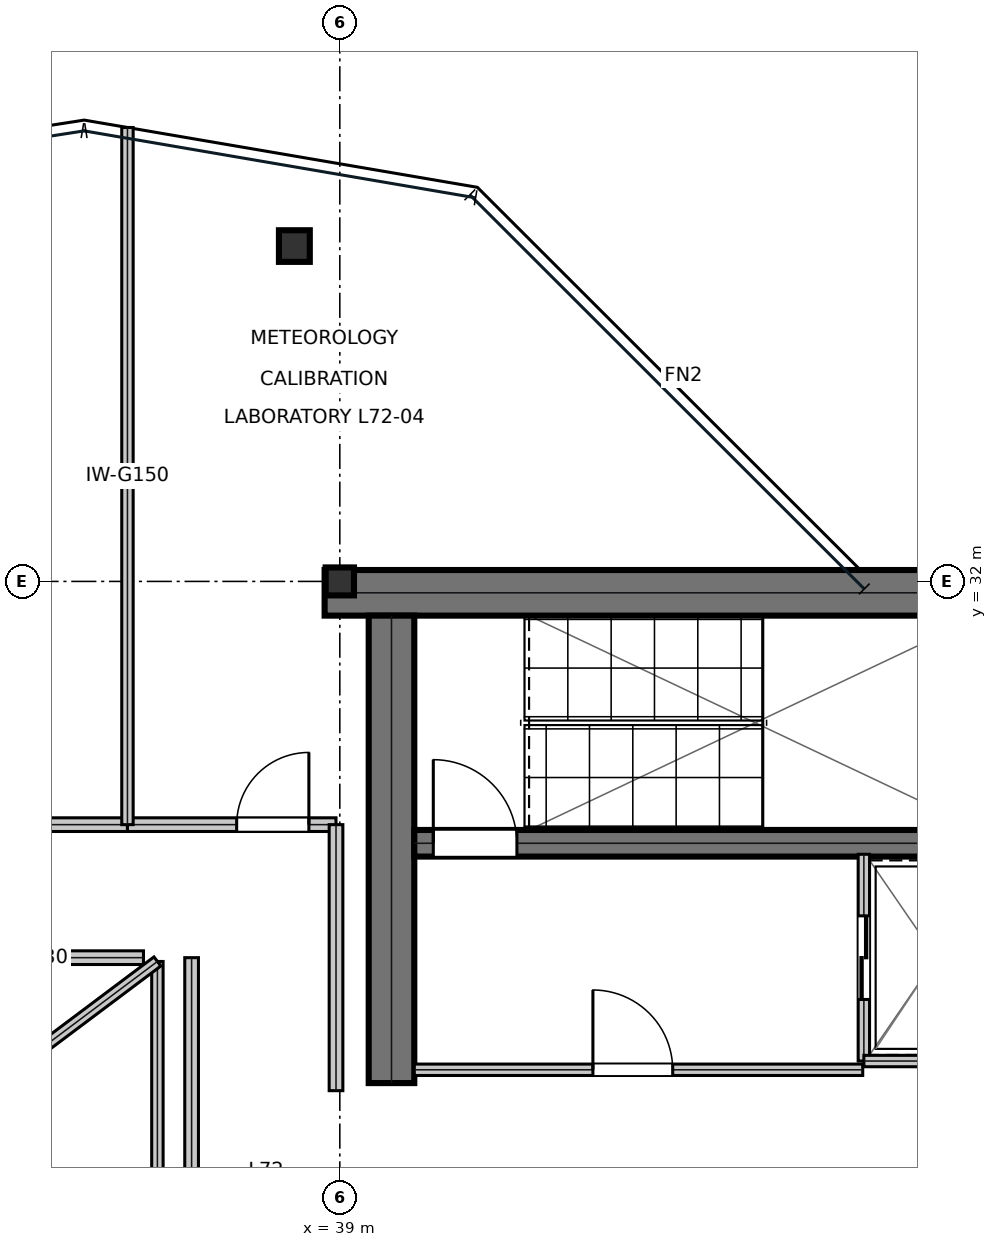
"""IFC4 building model, lengths in metres.
Left out: names, types, materials, properties, quantities, classifications, styles, units other than length and angle.
Written with IfcOpenShell. Run it as: python <this file> out.ifc"""

import sys

from ifc_helpers import new_model, si_unit, direction, frame, frame_2d, origin, origin_2d, place, context, subcontext, project, spatial, rectangle, i_section, extrude, element, fill, save


model = new_model("IFC4")
c1 = context("Model", 3, precision=1e-05, world=origin(), true_north=direction((0.0, 1.0)))
c2 = subcontext(c1, "Body", "Model", "MODEL_VIEW")
j1 = project(units=[si_unit("LENGTHUNIT", "METRE"), si_unit("PLANEANGLEUNIT", "RADIAN")], contexts=[c1])
p1 = place(None, origin())
s1 = spatial("IfcSite", under=j1, at=p1, CompositionType="ELEMENT")
p2 = place(p1, origin())
s2 = spatial("IfcBuilding", under=s1, at=p2, CompositionType="ELEMENT")
p3 = place(p2, frame((0.0, 0.0, 307.35)))
s3 = spatial("IfcBuildingStorey", under=s2, at=p3, CompositionType="ELEMENT", Elevation=307.35)
p4 = place(p3, frame((38.8, 31.85, 0.0), z_axis=(0.0, 0.0, 1.0), x_axis=(1.0, 0.0, 0.0)))
e1 = element("IfcWall", 1, at=p4, inside=s3, PredefinedType="SHEAR", context=c2, shape_type="SweptSolid", body=[
    extrude(rectangle(XDim=16.0, YDim=0.6, at=frame_2d((8.0, 0.0))), origin(), (0.0, 0.0, 1.0), 3.81),
])
p5 = place(p3, frame((39.68, 25.4, 0.0), z_axis=(0.0, 0.0, 1.0), x_axis=(0.0, 1.0, 0.0)))
e2 = element("IfcWall", 2, at=p5, inside=s3, PredefinedType="SHEAR", context=c2, shape_type="SweptSolid", body=[
    extrude(rectangle(XDim=6.15, YDim=0.6, at=frame_2d((3.075, 0.0))), origin(), (0.0, 0.0, 1.0), 3.81),
])
p6 = place(p3, frame((39.98, 28.555, 0.0), z_axis=(0.0, 0.0, 1.0), x_axis=(1.0, 0.0, 0.0)))
e3 = element("IfcWall", 3, at=p6, inside=s3, PredefinedType="SHEAR", context=c2, shape_type="SweptSolid", body=[
    extrude(rectangle(XDim=7.71, YDim=0.35, at=frame_2d((3.855, 0.0))), origin(), (0.0, 0.0, 1.0), 3.81),
])
p7 = place(p6, frame((0.25, 0.0, 0.0)))
e4 = element("IfcOpeningElement", 4, at=p7, cuts=e3, PredefinedType="OPENING", context=c2, shape_type="SweptSolid", body=[
    extrude(rectangle(XDim=1.1, YDim=2.15, at=frame_2d((0.55, 1.075))), frame((0.0, 0.185, 0.0), z_axis=(0.0, -1.0, 0.0), x_axis=(1.0, 0.0, 0.0)), (0.0, 0.0, 1.0), 0.37),
])
p8 = place(p3, frame((39.0, 32.0, 0.0), z_axis=(0.0, 0.0, 1.0), x_axis=(1.0, 0.0, 0.0)))
e5 = element("IfcColumn", 5, at=p8, inside=s3, PredefinedType="COLUMN", context=c2, shape_type="SweptSolid", body=[
    extrude(i_section(OverallWidth=0.373, OverallDepth=0.368, WebThickness=0.015, FlangeThickness=0.024, at=origin_2d()), origin(), (0.0, 0.0, 1.0), 4.044),
])
p9 = place(p3, frame((38.402, 36.412, 0.016), z_axis=(0.0, 0.0, 1.0), x_axis=(1.0, 0.0, 0.0)))
e6 = element("IfcColumn", 6, at=p9, inside=s3, PredefinedType="COLUMN", context=c2, shape_type="SweptSolid", body=[
    extrude(i_section(OverallWidth=0.406, OverallDepth=0.416, WebThickness=0.03, FlangeThickness=0.048, at=origin_2d()), origin(), (0.0, 0.0, 1.0), 4.018),
])
p10 = place(p3, frame((39.98, 25.575, 0.0), z_axis=(0.0, 0.0, 1.0), x_axis=(1.0, 0.0, 0.0)))
e7 = element("IfcWall", 7, at=p10, inside=s3, PredefinedType="PARTITIONING", context=c2, shape_type="SweptSolid", body=[
    extrude(rectangle(XDim=5.9, YDim=0.15, at=frame_2d((2.95, 0.0))), origin(), (0.0, 0.0, 1.0), 3.81),
])
p11 = place(p10, frame((2.35, 0.0, 0.0)))
e8 = element("IfcOpeningElement", 8, at=p11, cuts=e7, PredefinedType="OPENING", context=c2, shape_type="SweptSolid", body=[
    extrude(rectangle(XDim=1.05, YDim=2.15, at=frame_2d((0.525, 1.075))), frame((0.0, 0.085, 0.0), z_axis=(0.0, -1.0, 0.0), x_axis=(1.0, 0.0, 0.0)), (0.0, 0.0, 1.0), 0.17),
])
p12 = place(p3, frame((45.895, 25.69, 0.0), z_axis=(0.0, 0.0, 1.0), x_axis=(0.0, 1.0, 0.0)))
e9 = element("IfcWall", 9, at=p12, inside=s3, PredefinedType="PARTITIONING", context=c2, shape_type="SweptSolid", body=[
    extrude(rectangle(XDim=2.72, YDim=0.15, at=frame_2d((1.36, 0.0))), origin(), (0.0, 0.0, 1.0), 3.81),
])
p13 = place(p12, frame((0.81, 0.0, 0.0)))
e10 = element("IfcOpeningElement", 10, at=p13, cuts=e9, PredefinedType="OPENING", context=c2, shape_type="SweptSolid", body=[
    extrude(rectangle(XDim=1.1, YDim=2.15, at=frame_2d((0.55, 1.075))), frame((0.0, 0.085, 0.0), z_axis=(0.0, -1.0, 0.0), x_axis=(1.0, 0.0, 0.0)), (0.0, 0.0, 1.0), 0.17),
])
p14 = place(p3, frame((45.895, 25.69, 0.0), z_axis=(0.0, 0.0, 1.0), x_axis=(1.0, 0.0, 0.0)))
e11 = element("IfcWall", 11, at=p14, inside=s3, PredefinedType="PARTITIONING", context=c2, shape_type="SweptSolid", body=[
    extrude(rectangle(XDim=1.915, YDim=0.15, at=frame_2d((0.958, 0.0))), origin(), (0.0, 0.0, 1.0), 3.81),
])
p15 = place(p3, frame((26.35, 27.05, 0.0), z_axis=(0.0, 0.0, 1.0), x_axis=(1.0, 0.0, 0.0)))
e12 = element("IfcWall", 12, at=p15, inside=s3, PredefinedType="SOLIDWALL", context=c2, shape_type="SweptSolid", body=[
    extrude(rectangle(XDim=10.067, YDim=0.18, at=frame_2d((5.033, 0.0))), origin(), (0.0, 0.0, 1.0), 3.27),
])
p16 = place(p15, frame((4.558, 0.0, 0.0)))
e13 = element("IfcOpeningElement", 13, at=p16, cuts=e12, PredefinedType="OPENING", context=c2, shape_type="SweptSolid", body=[
    extrude(rectangle(XDim=0.95, YDim=2.15, at=frame_2d((0.475, 1.075))), frame((0.0, 0.1, 0.0), z_axis=(0.0, -1.0, 0.0), x_axis=(1.0, 0.0, 0.0)), (0.0, 0.0, 1.0), 0.2),
])
p17 = place(p3, frame((27.314, 28.8, 0.0), z_axis=(0.0, 0.0, 1.0), x_axis=(1.0, 0.0, 0.0)))
e14 = element("IfcWall", 14, at=p17, inside=s3, PredefinedType="SOLIDWALL", context=c2, shape_type="SweptSolid", body=[
    extrude(rectangle(XDim=8.892, YDim=0.18, at=frame_2d((4.446, 0.0))), origin(), (0.0, 0.0, 1.0), 3.27),
])
p18 = place(p17, frame((3.971, 0.0, 0.0)))
e15 = element("IfcOpeningElement", 15, at=p18, cuts=e14, PredefinedType="OPENING", context=c2, shape_type="SweptSolid", body=[
    extrude(rectangle(XDim=0.95, YDim=2.15, at=frame_2d((0.475, 1.075))), frame((0.0, 0.1, 0.0), z_axis=(0.0, -1.0, 0.0), x_axis=(1.0, 0.0, 0.0)), (0.0, 0.0, 1.0), 0.2),
])
p19 = place(p3, frame((36.206, 28.8, 0.0), z_axis=(0.0, 0.0, 1.0), x_axis=(1.0, 0.0, 0.0)))
e16 = element("IfcWall", 16, at=p19, inside=s3, PredefinedType="SOLIDWALL", context=c2, shape_type="SweptSolid", body=[
    extrude(rectangle(XDim=2.744, YDim=0.18, at=frame_2d((1.372, 0.0))), origin(), (0.0, 0.0, 1.0), 3.81),
])
p20 = place(p19, frame((1.437, 0.0, 0.0)))
e17 = element("IfcOpeningElement", 17, at=p20, cuts=e16, PredefinedType="OPENING", context=c2, shape_type="SweptSolid", body=[
    extrude(rectangle(XDim=0.95, YDim=2.15, at=frame_2d((0.475, 1.075))), frame((0.0, 0.1, 0.0), z_axis=(0.0, -1.0, 0.0), x_axis=(1.0, 0.0, 0.0)), (0.0, 0.0, 1.0), 0.2),
])
p21 = place(p3, frame((37.05, 19.2, 0.0), z_axis=(0.0, 0.0, 1.0), x_axis=(0.0, 1.0, 0.0)))
e18 = element("IfcWall", 18, at=p21, inside=s3, PredefinedType="SOLIDWALL", context=c2, shape_type="SweptSolid", body=[
    extrude(rectangle(XDim=7.85, YDim=0.18, at=frame_2d((3.925, 0.0))), origin(), (0.0, 0.0, 1.0), 3.54),
])
p22 = place(p3, frame((38.95, 25.3, 0.0), z_axis=(0.0, 0.0, 1.0), x_axis=(0.0, 1.0, 0.0)))
e19 = element("IfcWall", 19, at=p22, inside=s3, PredefinedType="SOLIDWALL", context=c2, shape_type="SweptSolid", body=[
    extrude(rectangle(XDim=3.5, YDim=0.18, at=frame_2d((1.75, 0.0))), origin(), (0.0, 0.0, 1.0), 3.54),
])
p23 = place(p3, frame((36.206, 28.8, 0.0), z_axis=(0.0, 0.0, 1.0), x_axis=(0.0, 1.0, 0.0)))
e20 = element("IfcWall", 20, at=p23, inside=s3, PredefinedType="MOVABLE", context=c2, shape_type="SweptSolid", body=[
    extrude(rectangle(XDim=9.172, YDim=0.15, at=frame_2d((4.586, 0.0))), origin(), (0.0, 0.0, 1.0), 3.27),
])
p24 = place(p3, frame((36.6, 21.0, 0.0), z_axis=(0.0, 0.0, 1.0), x_axis=(0.0, 1.0, 0.0)))
e21 = element("IfcWall", 21, at=p24, inside=s3, PredefinedType="MOVABLE", context=c2, shape_type="SweptSolid", body=[
    extrude(rectangle(XDim=6.0, YDim=0.15, at=frame_2d((3.0, 0.0))), origin(), (0.0, 0.0, 1.0), 3.81),
])
p25 = place(p3, frame((36.6, 27.0, 0.0), z_axis=(0.0, 0.0, 1.0), x_axis=(-0.8, -0.6, 0.0)))
e22 = element("IfcWall", 22, at=p25, inside=s3, PredefinedType="MOVABLE", context=c2, shape_type="SweptSolid", body=[
    extrude(rectangle(XDim=5.0, YDim=0.15, at=frame_2d((2.5, 0.0))), origin(), (0.0, 0.0, 1.0), 3.81),
])
p26 = place(p11, origin())
e23 = element("IfcDoor", 23, at=p26, inside=s3, OperationType="SINGLE_SWING_LEFT", PredefinedType="DOOR", context=c2, shape_type="SweptSolid", body=[
    extrude(rectangle(XDim=1.05, YDim=2.15, at=frame_2d((0.525, 1.075))), frame((0.0, 0.025, 0.0), z_axis=(0.0, -1.0, 0.0), x_axis=(1.0, 0.0, 0.0)), (0.0, 0.0, 1.0), 0.05),
])
fill(e8, e23)
p27 = place(p13, frame((1.1, 0.0, 0.0), z_axis=(0.0, 0.0, 1.0), x_axis=(-1.0, 0.0, 0.0)))
e24 = element("IfcDoor", 24, at=p27, inside=s3, OperationType="DOUBLE_DOOR_SLIDING", PredefinedType="DOOR", context=c2, shape_type="SweptSolid", body=[
    extrude(rectangle(XDim=1.1, YDim=2.15, at=frame_2d((0.55, 1.075))), frame((0.0, 0.025, 0.0), z_axis=(0.0, -1.0, 0.0), x_axis=(1.0, 0.0, 0.0)), (0.0, 0.0, 1.0), 0.05),
])
fill(e10, e24)
p28 = place(p20, origin())
e25 = element("IfcDoor", 25, at=p28, inside=s3, OperationType="SINGLE_SWING_RIGHT", PredefinedType="DOOR", context=c2, shape_type="SweptSolid", body=[
    extrude(rectangle(XDim=0.95, YDim=2.15, at=frame_2d((0.475, 1.075))), frame((0.0, 0.025, 0.0), z_axis=(0.0, -1.0, 0.0), x_axis=(1.0, 0.0, 0.0)), (0.0, 0.0, 1.0), 0.05),
])
fill(e17, e25)
p29 = place(p7, origin())
e26 = element("IfcDoor", 26, at=p29, inside=s3, OperationType="SINGLE_SWING_LEFT", PredefinedType="DOOR", context=c2, shape_type="SweptSolid", body=[
    extrude(rectangle(XDim=1.1, YDim=2.15, at=frame_2d((0.55, 1.075))), frame((0.0, 0.025, 0.0), z_axis=(0.0, -1.0, 0.0), x_axis=(1.0, 0.0, 0.0)), (0.0, 0.0, 1.0), 0.05),
])
fill(e4, e26)
save(model, sys.argv[1])
